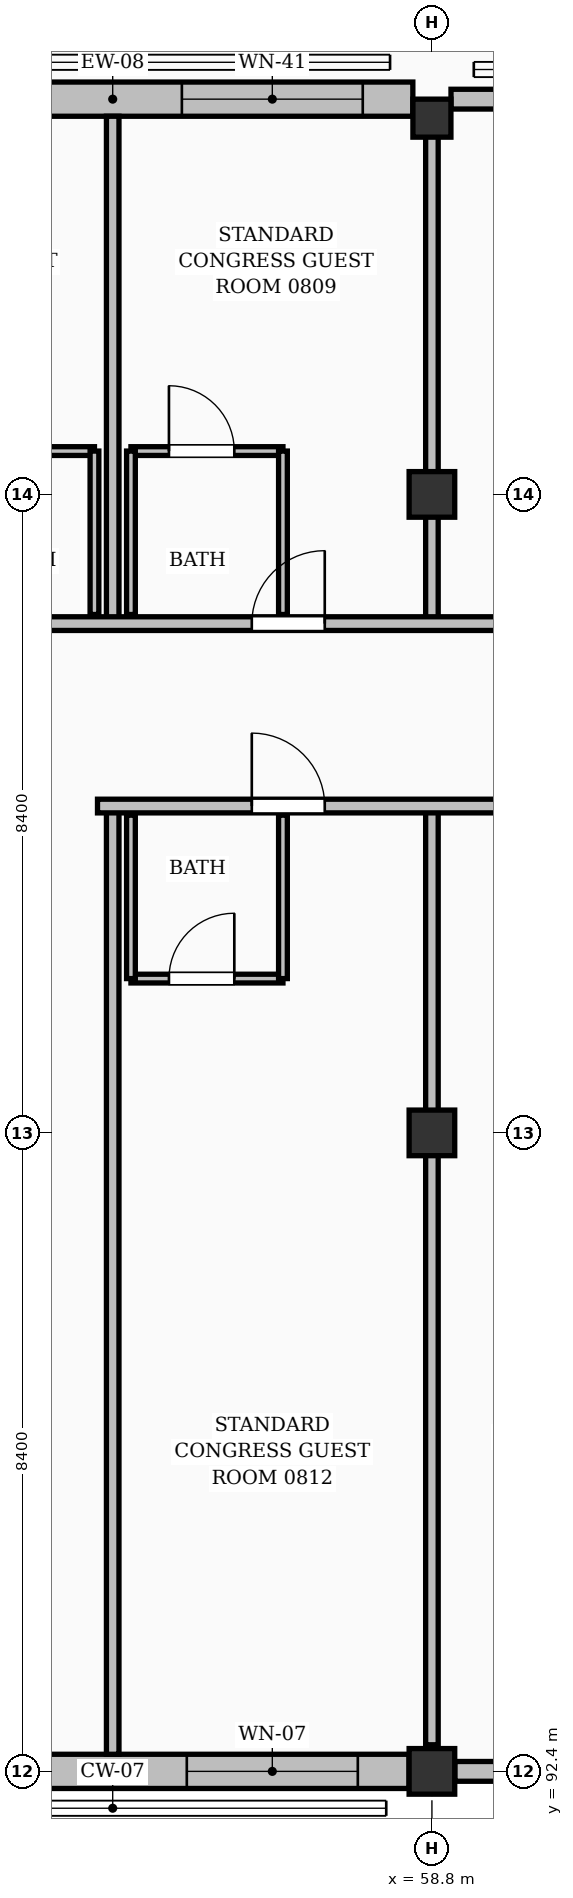
"""IFC4 building model, lengths in metres.
Left out: names, types, materials, properties, quantities, classifications, styles, units other than length and angle.
Written with IfcOpenShell. Run it as: python <this file> out.ifc"""

import sys

from ifc_helpers import new_model, si_unit, direction, frame, frame_2d, origin, origin_2d, place, context, subcontext, project, spatial, rectangle, extrude, element, fill, save


model = new_model("IFC4")
c1 = context("Model", 3, precision=1e-05, world=origin(), true_north=direction((0.0, 1.0)))
c2 = subcontext(c1, "Body", "Model", "MODEL_VIEW")
j1 = project(units=[si_unit("LENGTHUNIT", "METRE"), si_unit("PLANEANGLEUNIT", "RADIAN")], contexts=[c1])
p1 = place(None, origin())
s1 = spatial("IfcSite", under=j1, at=p1, CompositionType="ELEMENT")
p2 = place(p1, origin())
s2 = spatial("IfcBuilding", under=s1, at=p2, CompositionType="ELEMENT")
p3 = place(p2, frame((0.0, 0.0, 28.56)))
s3 = spatial("IfcBuildingStorey", under=s2, at=p3, CompositionType="ELEMENT", Elevation=28.56)
for number, where, z_axis, x_axis in (
    (1, (58.8, 92.4, 0.0), (0.0, 0.0, 1.0), (1.0, 0.0, 0.0)),
    (2, (58.8, 100.8, 0.0), (0.0, 0.0, 1.0), (1.0, 0.0, 0.0)),
    (3, (58.8, 109.2, 0.0), (0.0, 0.0, 1.0), (1.0, 0.0, 0.0)),
):
    element("IfcColumn", number, at=place(p3, frame(where, z_axis=z_axis, x_axis=x_axis)), inside=s3, PredefinedType="COLUMN", context=c2, shape_type="SweptSolid", body=[
        extrude(rectangle(XDim=0.6, YDim=0.6, at=origin_2d()), origin(), (0.0, 0.0, 1.0), 3.36),
    ])
p4 = place(p3, frame((58.8, 114.15, -0.315), z_axis=(0.0, 0.0, 1.0), x_axis=(1.0, 0.0, 0.0)))
e4 = element("IfcColumn", 4, at=p4, inside=s3, PredefinedType="COLUMN", context=c2, shape_type="SweptSolid", body=[
    extrude(rectangle(XDim=0.5, YDim=0.5, at=origin_2d()), origin(), (0.0, 0.0, 1.0), 3.675),
])
p5 = place(p3, frame((50.701, 92.4, 0.0), z_axis=(0.0, 0.0, 1.0), x_axis=(1.0, 0.0, 0.0)))
e5 = element("IfcWall", 5, at=p5, inside=s3, PredefinedType="SOLIDWALL", context=c2, shape_type="SweptSolid", body=[
    extrude(rectangle(XDim=7.798, YDim=0.45, at=frame_2d((3.899, 0.0))), origin(), (0.0, 0.0, 1.0), 2.494),
])
p6 = place(p5, frame((0.674, 0.0, 0.25)))
e6 = element("IfcOpeningElement", 6, at=p6, cuts=e5, PredefinedType="OPENING", context=c2, shape_type="SweptSolid", body=[
    extrude(rectangle(XDim=2.25, YDim=1.85, at=frame_2d((1.125, 0.925))), frame((0.0, 0.235, 0.0), z_axis=(0.0, -1.0, 0.0), x_axis=(1.0, 0.0, 0.0)), (0.0, 0.0, 1.0), 0.47),
])
p7 = place(p5, frame((4.874, 0.0, 0.25)))
e7 = element("IfcOpeningElement", 7, at=p7, cuts=e5, PredefinedType="OPENING", context=c2, shape_type="SweptSolid", body=[
    extrude(rectangle(XDim=2.25, YDim=1.95, at=frame_2d((1.125, 0.975))), frame((0.0, 0.235, 0.0), z_axis=(0.0, -1.0, 0.0), x_axis=(1.0, 0.0, 0.0)), (0.0, 0.0, 1.0), 0.47),
])
p8 = place(p3, frame((59.101, 92.4, 0.0), z_axis=(0.0, 0.0, 1.0), x_axis=(1.0, 0.0, 0.0)))
e8 = element("IfcWall", 8, at=p8, inside=s3, PredefinedType="SOLIDWALL", context=c2, shape_type="SweptSolid", body=[
    extrude(rectangle(XDim=7.798, YDim=0.26, at=frame_2d((3.899, 0.0))), origin(), (0.0, 0.0, 1.0), 2.494),
])
p9 = place(p8, frame((1.024, 0.0, 0.0)))
e9 = element("IfcOpeningElement", 9, at=p9, cuts=e8, PredefinedType="OPENING", context=c2, shape_type="SweptSolid", body=[
    extrude(rectangle(XDim=1.65, YDim=2.08, at=frame_2d((0.825, 1.04))), frame((0.0, 0.14, 0.0), z_axis=(0.0, -1.0, 0.0), x_axis=(1.0, 0.0, 0.0)), (0.0, 0.0, 1.0), 0.28),
])
p10 = place(p8, frame((4.724, 0.0, 0.25)))
e10 = element("IfcOpeningElement", 10, at=p10, cuts=e8, PredefinedType="OPENING", context=c2, shape_type="SweptSolid", body=[
    extrude(rectangle(XDim=2.25, YDim=1.95, at=frame_2d((1.125, 0.975))), frame((0.0, 0.14, 0.0), z_axis=(0.0, -1.0, 0.0), x_axis=(1.0, 0.0, 0.0)), (0.0, 0.0, 1.0), 0.28),
])
p11 = place(p3, frame((50.651, 114.4, 0.0), z_axis=(0.0, 0.0, 1.0), x_axis=(1.0, 0.0, 0.0)))
e11 = element("IfcWall", 11, at=p11, inside=s3, PredefinedType="SOLIDWALL", context=c2, shape_type="SweptSolid", body=[
    extrude(rectangle(XDim=7.898, YDim=0.45, at=frame_2d((3.949, 0.0))), origin(), (0.0, 0.0, 1.0), 2.494),
])
p12 = place(p11, frame((0.639, 0.0, 0.25)))
e12 = element("IfcOpeningElement", 12, at=p12, cuts=e11, PredefinedType="OPENING", context=c2, shape_type="SweptSolid", body=[
    extrude(rectangle(XDim=2.42, YDim=1.9, at=frame_2d((1.21, 0.95))), frame((0.0, 0.235, 0.0), z_axis=(0.0, -1.0, 0.0), x_axis=(1.0, 0.0, 0.0)), (0.0, 0.0, 1.0), 0.47),
])
p13 = place(p11, frame((4.859, 0.0, 0.25)))
e13 = element("IfcOpeningElement", 13, at=p13, cuts=e11, PredefinedType="OPENING", context=c2, shape_type="SweptSolid", body=[
    extrude(rectangle(XDim=2.38, YDim=2.0, at=frame_2d((1.19, 1.0))), frame((0.0, 0.235, 0.0), z_axis=(0.0, -1.0, 0.0), x_axis=(1.0, 0.0, 0.0)), (0.0, 0.0, 1.0), 0.47),
])
p14 = place(p3, frame((59.051, 114.4, 0.0), z_axis=(0.0, 0.0, 1.0), x_axis=(1.0, 0.0, 0.0)))
e14 = element("IfcWall", 14, at=p14, inside=s3, PredefinedType="SOLIDWALL", context=c2, shape_type="SweptSolid", body=[
    extrude(rectangle(XDim=7.898, YDim=0.26, at=frame_2d((3.949, 0.0))), origin(), (0.0, 0.0, 1.0), 2.494),
])
p15 = place(p14, frame((0.659, 0.0, 0.25)))
e15 = element("IfcOpeningElement", 15, at=p15, cuts=e14, PredefinedType="OPENING", context=c2, shape_type="SweptSolid", body=[
    extrude(rectangle(XDim=2.38, YDim=2.0, at=frame_2d((1.19, 1.0))), frame((0.0, 0.14, 0.0), z_axis=(0.0, -1.0, 0.0), x_axis=(1.0, 0.0, 0.0)), (0.0, 0.0, 1.0), 0.28),
])
p16 = place(p14, frame((4.874, 0.0, 0.25)))
e16 = element("IfcOpeningElement", 16, at=p16, cuts=e14, PredefinedType="OPENING", context=c2, shape_type="SweptSolid", body=[
    extrude(rectangle(XDim=2.35, YDim=1.85, at=frame_2d((1.175, 0.925))), frame((0.0, 0.14, 0.0), z_axis=(0.0, -1.0, 0.0), x_axis=(1.0, 0.0, 0.0)), (0.0, 0.0, 1.0), 0.28),
])
p17 = place(p3, frame((52.36, 109.77, 0.0), z_axis=(0.0, 0.0, 1.0), x_axis=(1.0, 0.0, 0.0)))
e17 = element("IfcWall", 17, at=p17, inside=s3, PredefinedType="PARTITIONING", context=c2, shape_type="SweptSolid", body=[
    extrude(rectangle(XDim=2.0, YDim=0.115, at=frame_2d((1.0, 0.0))), origin(), (0.0, 0.0, 1.0), 3.12),
])
p18 = place(p17, frame((0.5, 0.0, 0.0)))
e18 = element("IfcOpeningElement", 18, at=p18, cuts=e17, PredefinedType="OPENING", context=c2, shape_type="SweptSolid", body=[
    extrude(rectangle(XDim=0.86, YDim=2.05, at=frame_2d((0.43, 1.025))), frame((0.0, 0.067, 0.0), z_axis=(0.0, -1.0, 0.0), x_axis=(1.0, 0.0, 0.0)), (0.0, 0.0, 1.0), 0.135),
])
p19 = place(p3, frame((54.36, 107.62, 0.0), z_axis=(0.0, 0.0, 1.0), x_axis=(0.0, 1.0, 0.0)))
e19 = element("IfcWall", 19, at=p19, inside=s3, PredefinedType="PARTITIONING", context=c2, shape_type="SweptSolid", body=[
    extrude(rectangle(XDim=2.15, YDim=0.115, at=frame_2d((1.075, 0.0))), origin(), (0.0, 0.0, 1.0), 3.12),
])
p20 = place(p3, frame((54.84, 109.77, 0.0), z_axis=(0.0, 0.0, 1.0), x_axis=(1.0, 0.0, 0.0)))
e20 = element("IfcWall", 20, at=p20, inside=s3, PredefinedType="PARTITIONING", context=c2, shape_type="SweptSolid", body=[
    extrude(rectangle(XDim=2.0, YDim=0.115, at=frame_2d((1.0, 0.0))), origin(), (0.0, 0.0, 1.0), 3.12),
])
p21 = place(p20, frame((0.5, 0.0, 0.0)))
e21 = element("IfcOpeningElement", 21, at=p21, cuts=e20, PredefinedType="OPENING", context=c2, shape_type="SweptSolid", body=[
    extrude(rectangle(XDim=0.86, YDim=2.05, at=frame_2d((0.43, 1.025))), frame((0.0, 0.067, 0.0), z_axis=(0.0, -1.0, 0.0), x_axis=(1.0, 0.0, 0.0)), (0.0, 0.0, 1.0), 0.135),
])
for number, where, z_axis, x_axis in (
    (22, (54.84, 107.62, 0.0), (0.0, 0.0, 1.0), (0.0, 1.0, 0.0)),
    (23, (56.84, 107.62, 0.0), (0.0, 0.0, 1.0), (0.0, 1.0, 0.0)),
):
    element("IfcWall", number, at=place(p3, frame(where, z_axis=z_axis, x_axis=x_axis)), inside=s3, PredefinedType="PARTITIONING", context=c2, shape_type="SweptSolid", body=[
        extrude(rectangle(XDim=2.15, YDim=0.115, at=frame_2d((1.075, 0.0))), origin(), (0.0, 0.0, 1.0), 3.12),
    ])
p22 = place(p3, frame((54.6, 107.5, 0.0), z_axis=(0.0, 0.0, 1.0), x_axis=(0.0, 1.0, 0.0)))
e24 = element("IfcWall", 24, at=p22, inside=s3, PredefinedType="PARTITIONING", context=c2, shape_type="SweptSolid", body=[
    extrude(rectangle(XDim=6.675, YDim=0.165, at=frame_2d((3.337, 0.0))), origin(), (0.0, 0.0, 1.0), 3.12),
])
p23 = place(p3, frame((58.8, 107.5, 0.0), z_axis=(0.0, 0.0, 1.0), x_axis=(0.0, 1.0, 0.0)))
e25 = element("IfcWall", 25, at=p23, inside=s3, PredefinedType="PARTITIONING", context=c2, shape_type="SweptSolid", body=[
    extrude(rectangle(XDim=6.55, YDim=0.165, at=frame_2d((3.275, 0.0))), origin(), (0.0, 0.0, 1.0), 2.41),
])
p24 = place(p3, frame((40.66, 107.5, 0.0), z_axis=(0.0, 0.0, 1.0), x_axis=(1.0, 0.0, 0.0)))
e26 = element("IfcWall", 26, at=p24, inside=s3, PredefinedType="PARTITIONING", context=c2, shape_type="SweptSolid", body=[
    extrude(rectangle(XDim=26.378, YDim=0.18, at=frame_2d((13.189, 0.0))), origin(), (0.0, 0.0, 1.0), 3.12),
])
p25 = place(p24, frame((0.2, 0.0, 0.0)))
e27 = element("IfcOpeningElement", 27, at=p25, cuts=e26, PredefinedType="OPENING", context=c2, shape_type="SweptSolid", body=[
    extrude(rectangle(XDim=0.94, YDim=2.1, at=frame_2d((0.47, 1.05))), frame((0.0, 0.1, 0.0), z_axis=(0.0, -1.0, 0.0), x_axis=(1.0, 0.0, 0.0)), (0.0, 0.0, 1.0), 0.2),
])
p26 = place(p24, frame((2.71, 0.0, 0.0)))
e28 = element("IfcOpeningElement", 28, at=p26, cuts=e26, PredefinedType="OPENING", context=c2, shape_type="SweptSolid", body=[
    extrude(rectangle(XDim=0.96, YDim=2.15, at=frame_2d((0.48, 1.075))), frame((0.0, 0.1, 0.0), z_axis=(0.0, -1.0, 0.0), x_axis=(1.0, 0.0, 0.0)), (0.0, 0.0, 1.0), 0.2),
])
p27 = place(p24, frame((7.37, 0.0, 0.0)))
e29 = element("IfcOpeningElement", 29, at=p27, cuts=e26, PredefinedType="OPENING", context=c2, shape_type="SweptSolid", body=[
    extrude(rectangle(XDim=0.96, YDim=2.15, at=frame_2d((0.48, 1.075))), frame((0.0, 0.1, 0.0), z_axis=(0.0, -1.0, 0.0), x_axis=(1.0, 0.0, 0.0)), (0.0, 0.0, 1.0), 0.2),
])
p28 = place(p24, frame((11.11, 0.0, 0.0)))
e30 = element("IfcOpeningElement", 30, at=p28, cuts=e26, PredefinedType="OPENING", context=c2, shape_type="SweptSolid", body=[
    extrude(rectangle(XDim=0.96, YDim=2.15, at=frame_2d((0.48, 1.075))), frame((0.0, 0.1, 0.0), z_axis=(0.0, -1.0, 0.0), x_axis=(1.0, 0.0, 0.0)), (0.0, 0.0, 1.0), 0.2),
])
p29 = place(p24, frame((15.77, 0.0, 0.0)))
e31 = element("IfcOpeningElement", 31, at=p29, cuts=e26, PredefinedType="OPENING", context=c2, shape_type="SweptSolid", body=[
    extrude(rectangle(XDim=0.96, YDim=2.15, at=frame_2d((0.48, 1.075))), frame((0.0, 0.1, 0.0), z_axis=(0.0, -1.0, 0.0), x_axis=(1.0, 0.0, 0.0)), (0.0, 0.0, 1.0), 0.2),
])
p30 = place(p24, frame((19.51, 0.0, 0.0)))
e32 = element("IfcOpeningElement", 32, at=p30, cuts=e26, PredefinedType="OPENING", context=c2, shape_type="SweptSolid", body=[
    extrude(rectangle(XDim=0.96, YDim=2.15, at=frame_2d((0.48, 1.075))), frame((0.0, 0.1, 0.0), z_axis=(0.0, -1.0, 0.0), x_axis=(1.0, 0.0, 0.0)), (0.0, 0.0, 1.0), 0.2),
])
p31 = place(p24, frame((24.17, 0.0, 0.0)))
e33 = element("IfcOpeningElement", 33, at=p31, cuts=e26, PredefinedType="OPENING", context=c2, shape_type="SweptSolid", body=[
    extrude(rectangle(XDim=0.96, YDim=2.15, at=frame_2d((0.48, 1.075))), frame((0.0, 0.1, 0.0), z_axis=(0.0, -1.0, 0.0), x_axis=(1.0, 0.0, 0.0)), (0.0, 0.0, 1.0), 0.2),
])
p32 = place(p3, frame((54.84, 102.83, 0.0), z_axis=(0.0, 0.0, 1.0), x_axis=(1.0, 0.0, 0.0)))
e34 = element("IfcWall", 34, at=p32, inside=s3, PredefinedType="PARTITIONING", context=c2, shape_type="SweptSolid", body=[
    extrude(rectangle(XDim=2.0, YDim=0.115, at=frame_2d((1.0, 0.0))), origin(), (0.0, 0.0, 1.0), 3.12),
])
p33 = place(p32, frame((0.5, 0.0, 0.0)))
e35 = element("IfcOpeningElement", 35, at=p33, cuts=e34, PredefinedType="OPENING", context=c2, shape_type="SweptSolid", body=[
    extrude(rectangle(XDim=0.86, YDim=2.05, at=frame_2d((0.43, 1.025))), frame((0.0, 0.067, 0.0), z_axis=(0.0, -1.0, 0.0), x_axis=(1.0, 0.0, 0.0)), (0.0, 0.0, 1.0), 0.135),
])
for number, where, z_axis, x_axis in (
    (36, (54.84, 102.83, 0.0), (0.0, 0.0, 1.0), (0.0, 1.0, 0.0)),
    (37, (56.84, 102.83, 0.0), (0.0, 0.0, 1.0), (0.0, 1.0, 0.0)),
):
    element("IfcWall", number, at=place(p3, frame(where, z_axis=z_axis, x_axis=x_axis)), inside=s3, PredefinedType="PARTITIONING", context=c2, shape_type="SweptSolid", body=[
        extrude(rectangle(XDim=2.15, YDim=0.115, at=frame_2d((1.075, 0.0))), origin(), (0.0, 0.0, 1.0), 3.12),
    ])
p34 = place(p3, frame((54.6, 92.625, 0.0), z_axis=(0.0, 0.0, 1.0), x_axis=(0.0, 1.0, 0.0)))
e38 = element("IfcWall", 38, at=p34, inside=s3, PredefinedType="PARTITIONING", context=c2, shape_type="SweptSolid", body=[
    extrude(rectangle(XDim=12.475, YDim=0.165, at=frame_2d((6.238, 0.0))), origin(), (0.0, 0.0, 1.0), 3.12),
])
p35 = place(p3, frame((58.8, 92.75, 0.0), z_axis=(0.0, 0.0, 1.0), x_axis=(0.0, 1.0, 0.0)))
e39 = element("IfcWall", 39, at=p35, inside=s3, PredefinedType="PARTITIONING", context=c2, shape_type="SweptSolid", body=[
    extrude(rectangle(XDim=12.35, YDim=0.165, at=frame_2d((6.175, 0.0))), origin(), (0.0, 0.0, 1.0), 2.455),
])
p36 = place(p3, frame((54.4, 105.1, 0.0), z_axis=(0.0, 0.0, 1.0), x_axis=(1.0, 0.0, 0.0)))
e40 = element("IfcWall", 40, at=p36, inside=s3, PredefinedType="PARTITIONING", context=c2, shape_type="SweptSolid", body=[
    extrude(rectangle(XDim=12.638, YDim=0.18, at=frame_2d((6.319, 0.0))), origin(), (0.0, 0.0, 1.0), 3.12),
])
p37 = place(p36, frame((2.03, 0.0, 0.0)))
e41 = element("IfcOpeningElement", 41, at=p37, cuts=e40, PredefinedType="OPENING", context=c2, shape_type="SweptSolid", body=[
    extrude(rectangle(XDim=0.96, YDim=2.15, at=frame_2d((0.48, 1.075))), frame((0.0, 0.1, 0.0), z_axis=(0.0, -1.0, 0.0), x_axis=(1.0, 0.0, 0.0)), (0.0, 0.0, 1.0), 0.2),
])
p38 = place(p36, frame((5.77, 0.0, 0.0)))
e42 = element("IfcOpeningElement", 42, at=p38, cuts=e40, PredefinedType="OPENING", context=c2, shape_type="SweptSolid", body=[
    extrude(rectangle(XDim=0.96, YDim=2.15, at=frame_2d((0.48, 1.075))), frame((0.0, 0.1, 0.0), z_axis=(0.0, -1.0, 0.0), x_axis=(1.0, 0.0, 0.0)), (0.0, 0.0, 1.0), 0.2),
])
p39 = place(p36, frame((10.43, 0.0, 0.0)))
e43 = element("IfcOpeningElement", 43, at=p39, cuts=e40, PredefinedType="OPENING", context=c2, shape_type="SweptSolid", body=[
    extrude(rectangle(XDim=0.96, YDim=2.15, at=frame_2d((0.48, 1.075))), frame((0.0, 0.1, 0.0), z_axis=(0.0, -1.0, 0.0), x_axis=(1.0, 0.0, 0.0)), (0.0, 0.0, 1.0), 0.2),
])
p40 = place(p7, origin())
e44 = element("IfcWindow", 44, at=p40, inside=s3, PartitioningType="DOUBLE_PANEL_VERTICAL", PredefinedType="WINDOW", context=c2, shape_type="SweptSolid", body=[
    extrude(rectangle(XDim=2.25, YDim=1.95, at=frame_2d((1.125, 0.975))), frame((0.0, 0.03, 0.0), z_axis=(0.0, -1.0, 0.0), x_axis=(1.0, 0.0, 0.0)), (0.0, 0.0, 1.0), 0.06),
])
fill(e7, e44)
p41 = place(p13, origin())
e45 = element("IfcWindow", 45, at=p41, inside=s3, PartitioningType="DOUBLE_PANEL_VERTICAL", PredefinedType="WINDOW", context=c2, shape_type="SweptSolid", body=[
    extrude(rectangle(XDim=2.38, YDim=2.0, at=frame_2d((1.19, 1.0))), frame((0.0, 0.03, 0.0), z_axis=(0.0, -1.0, 0.0), x_axis=(1.0, 0.0, 0.0)), (0.0, 0.0, 1.0), 0.06),
])
fill(e13, e45)
p42 = place(p21, origin())
e46 = element("IfcDoor", 46, at=p42, inside=s3, OperationType="SINGLE_SWING_LEFT", PredefinedType="DOOR", context=c2, shape_type="SweptSolid", body=[
    extrude(rectangle(XDim=0.86, YDim=2.05, at=frame_2d((0.43, 1.025))), frame((0.0, 0.025, 0.0), z_axis=(0.0, -1.0, 0.0), x_axis=(1.0, 0.0, 0.0)), (0.0, 0.0, 1.0), 0.05),
])
fill(e21, e46)
p43 = place(p29, origin())
e47 = element("IfcDoor", 47, at=p43, inside=s3, OperationType="SINGLE_SWING_RIGHT", PredefinedType="DOOR", context=c2, shape_type="SweptSolid", body=[
    extrude(rectangle(XDim=0.96, YDim=2.15, at=frame_2d((0.48, 1.075))), frame((0.0, 0.025, 0.0), z_axis=(0.0, -1.0, 0.0), x_axis=(1.0, 0.0, 0.0)), (0.0, 0.0, 1.0), 0.05),
])
fill(e31, e47)
p44 = place(p33, origin())
e48 = element("IfcDoor", 48, at=p44, inside=s3, OperationType="SINGLE_SWING_RIGHT", PredefinedType="DOOR", context=c2, shape_type="SweptSolid", body=[
    extrude(rectangle(XDim=0.86, YDim=2.05, at=frame_2d((0.43, 1.025))), frame((0.0, 0.025, 0.0), z_axis=(0.0, -1.0, 0.0), x_axis=(1.0, 0.0, 0.0)), (0.0, 0.0, 1.0), 0.05),
])
fill(e35, e48)
p45 = place(p37, origin())
e49 = element("IfcDoor", 49, at=p45, inside=s3, OperationType="SINGLE_SWING_LEFT", PredefinedType="DOOR", context=c2, shape_type="SweptSolid", body=[
    extrude(rectangle(XDim=0.96, YDim=2.15, at=frame_2d((0.48, 1.075))), frame((0.0, 0.025, 0.0), z_axis=(0.0, -1.0, 0.0), x_axis=(1.0, 0.0, 0.0)), (0.0, 0.0, 1.0), 0.05),
])
fill(e41, e49)
save(model, sys.argv[1])
